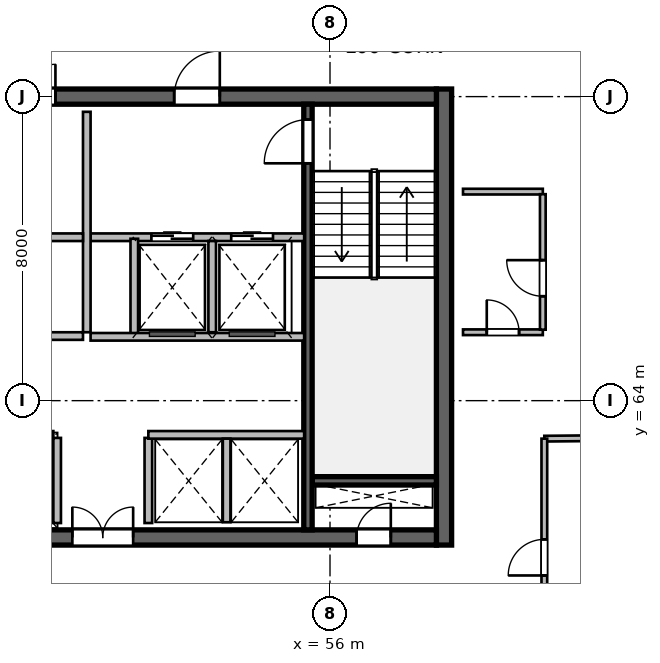
"""IFC4 building model, lengths in metres.
Left out: names, types, materials, properties, quantities, classifications, styles, units other than length and angle.
Written with IfcOpenShell. Run it as: python <this file> out.ifc"""

import sys

from ifc_helpers import new_model, si_unit, direction, frame, frame_2d, origin, place, context, subcontext, project, spatial, rectangle, extrude, source, transform, mapped, element, fill, save


model = new_model("IFC4")
c1 = context("Model", 3, precision=1e-05, world=origin(), true_north=direction((0.0, 1.0)))
c2 = subcontext(c1, "Body", "Model", "MODEL_VIEW")
j1 = project(units=[si_unit("LENGTHUNIT", "METRE"), si_unit("PLANEANGLEUNIT", "RADIAN")], contexts=[c1])
p1 = place(None, origin())
s1 = spatial("IfcSite", under=j1, at=p1, CompositionType="ELEMENT")
p2 = place(p1, origin())
s2 = spatial("IfcBuilding", under=s1, at=p2, CompositionType="ELEMENT")
p3 = place(p2, frame((0.0, 0.0, 271.8)))
s3 = spatial("IfcBuildingStorey", under=s2, at=p3, CompositionType="ELEMENT", Elevation=271.8)
m1 = source(origin(), c2, "Body", "SweptSolid", [
    extrude(rectangle(XDim=12.0, YDim=0.4, at=frame_2d((6.0, 0.0))), origin(), (0.0, 0.0, 1.0), 3.9),
])
p4 = place(p3, frame((59.0, 60.2, 0.0), z_axis=(0.0, 0.0, 1.0), x_axis=(0.0, 1.0, 0.0)))
e1 = element("IfcWall", 1, at=p4, inside=s3, PredefinedType="SHEAR", context=c2, shape_type="MappedRepresentation", body=[
    mapped(m1, transform((0.0, 0.0, 0.0), scale=1.0)),
])
m2 = source(origin(), c2, "Body", "SweptSolid", [
    extrude(rectangle(XDim=21.6, YDim=0.4, at=frame_2d((10.8, 0.0))), origin(), (0.0, 0.0, 1.0), 3.9),
])
p5 = place(p3, frame((37.2, 60.4, 0.0), z_axis=(0.0, 0.0, 1.0), x_axis=(1.0, 0.0, 0.0)))
e2 = element("IfcWall", 2, at=p5, inside=s3, PredefinedType="SHEAR", context=c2, shape_type="MappedRepresentation", body=[
    mapped(m2, transform((0.0, 0.0, 0.0), scale=1.0)),
])
p6 = place(p5, frame((1.1, 0.0, 0.0)))
e3 = element("IfcOpeningElement", 3, at=p6, cuts=e2, PredefinedType="OPENING", context=c2, shape_type="SweptSolid", body=[
    extrude(rectangle(XDim=1.15, YDim=2.15, at=frame_2d((0.575, 1.075))), frame((0.0, 0.21, 0.0), z_axis=(0.0, -1.0, 0.0), x_axis=(1.0, 0.0, 0.0)), (0.0, 0.0, 1.0), 0.42),
])
p7 = place(p5, frame((19.5, 0.0, 0.0)))
e4 = element("IfcOpeningElement", 4, at=p7, cuts=e2, PredefinedType="OPENING", context=c2, shape_type="SweptSolid", body=[
    extrude(rectangle(XDim=0.9, YDim=2.1, at=frame_2d((0.45, 1.05))), frame((0.0, 0.21, 0.0), z_axis=(0.0, -1.0, 0.0), x_axis=(1.0, 0.0, 0.0)), (0.0, 0.0, 1.0), 0.42),
])
p8 = place(p5, frame((12.02, 0.0, 0.0)))
e5 = element("IfcOpeningElement", 5, at=p8, cuts=e2, PredefinedType="OPENING", context=c2, shape_type="SweptSolid", body=[
    extrude(rectangle(XDim=1.6, YDim=2.15, at=frame_2d((0.8, 1.075))), frame((0.0, 0.21, 0.0), z_axis=(0.0, -1.0, 0.0), x_axis=(1.0, 0.0, 0.0)), (0.0, 0.0, 1.0), 0.42),
])
p9 = place(p3, frame((37.2, 72.0, 0.0), z_axis=(0.0, 0.0, 1.0), x_axis=(1.0, 0.0, 0.0)))
e6 = element("IfcWall", 6, at=p9, inside=s3, PredefinedType="SHEAR", context=c2, shape_type="MappedRepresentation", body=[
    mapped(m2, transform((0.0, 0.0, 0.0), scale=1.0)),
])
p10 = place(p9, frame((1.2, 0.0, 0.0)))
e7 = element("IfcOpeningElement", 7, at=p10, cuts=e6, PredefinedType="OPENING", context=c2, shape_type="SweptSolid", body=[
    extrude(rectangle(XDim=0.9, YDim=2.1, at=frame_2d((0.45, 1.05))), frame((0.0, 0.21, 0.0), z_axis=(0.0, -1.0, 0.0), x_axis=(1.0, 0.0, 0.0)), (0.0, 0.0, 1.0), 0.42),
])
p11 = place(p9, frame((14.7, 0.0, 0.0)))
e8 = element("IfcOpeningElement", 8, at=p11, cuts=e6, PredefinedType="OPENING", context=c2, shape_type="SweptSolid", body=[
    extrude(rectangle(XDim=1.2, YDim=2.15, at=frame_2d((0.6, 1.075))), frame((0.0, 0.21, 0.0), z_axis=(0.0, -1.0, 0.0), x_axis=(1.0, 0.0, 0.0)), (0.0, 0.0, 1.0), 0.42),
])
p12 = place(p9, frame((4.15, 0.0, 0.0)))
e9 = element("IfcOpeningElement", 9, at=p12, cuts=e6, PredefinedType="OPENING", context=c2, shape_type="SweptSolid", body=[
    extrude(rectangle(XDim=1.3, YDim=2.15, at=frame_2d((0.65, 1.075))), frame((0.0, 0.21, 0.0), z_axis=(0.0, -1.0, 0.0), x_axis=(1.0, 0.0, 0.0)), (0.0, 0.0, 1.0), 0.42),
])
p13 = place(p9, frame((6.76, 0.0, 0.0)))
e10 = element("IfcOpeningElement", 10, at=p13, cuts=e6, PredefinedType="OPENING", context=c2, shape_type="SweptSolid", body=[
    extrude(rectangle(XDim=0.85, YDim=2.1, at=frame_2d((0.425, 1.05))), frame((0.0, 0.21, 0.0), z_axis=(0.0, -1.0, 0.0), x_axis=(1.0, 0.0, 0.0)), (0.0, 0.0, 1.0), 0.42),
])
p14 = place(p9, frame((8.76, 0.0, 0.0)))
e11 = element("IfcOpeningElement", 11, at=p14, cuts=e6, PredefinedType="OPENING", context=c2, shape_type="SweptSolid", body=[
    extrude(rectangle(XDim=0.85, YDim=2.1, at=frame_2d((0.425, 1.05))), frame((0.0, 0.21, 0.0), z_axis=(0.0, -1.0, 0.0), x_axis=(1.0, 0.0, 0.0)), (0.0, 0.0, 1.0), 0.42),
])
p15 = place(p9, frame((10.725, 0.0, 0.0)))
e12 = element("IfcOpeningElement", 12, at=p15, cuts=e6, PredefinedType="OPENING", context=c2, shape_type="SweptSolid", body=[
    extrude(rectangle(XDim=0.85, YDim=2.1, at=frame_2d((0.425, 1.05))), frame((0.0, 0.21, 0.0), z_axis=(0.0, -1.0, 0.0), x_axis=(1.0, 0.0, 0.0)), (0.0, 0.0, 1.0), 0.42),
])
m3 = source(origin(), c2, "Body", "SweptSolid", [
    extrude(rectangle(XDim=3.27, YDim=0.22, at=frame_2d((1.635, 0.0))), origin(), (0.0, 0.0, 1.0), 3.9),
])
p16 = place(p3, frame((55.53, 61.89, 0.0), z_axis=(0.0, 0.0, 1.0), x_axis=(1.0, 0.0, 0.0)))
e13 = element("IfcWall", 13, at=p16, inside=s3, PredefinedType="SHEAR", context=c2, shape_type="MappedRepresentation", body=[
    mapped(m3, transform((0.0, 0.0, 0.0), scale=1.0)),
])
m4 = source(origin(), c2, "Body", "SweptSolid", [
    extrude(rectangle(XDim=11.2, YDim=0.22, at=frame_2d((5.6, 0.0))), origin(), (0.0, 0.0, 1.0), 3.9),
])
p17 = place(p3, frame((55.42, 60.6, 0.0), z_axis=(0.0, 0.0, 1.0), x_axis=(0.0, 1.0, 0.0)))
e14 = element("IfcWall", 14, at=p17, inside=s3, PredefinedType="SHEAR", context=c2, shape_type="MappedRepresentation", body=[
    mapped(m4, transform((0.0, 0.0, 0.0), scale=1.0)),
])
p18 = place(p17, frame((9.645, 0.0, 0.0)))
e15 = element("IfcOpeningElement", 15, at=p18, cuts=e14, PredefinedType="OPENING", context=c2, shape_type="SweptSolid", body=[
    extrude(rectangle(XDim=1.15, YDim=2.15, at=frame_2d((0.575, 1.075))), frame((0.0, 0.12, 0.0), z_axis=(0.0, -1.0, 0.0), x_axis=(1.0, 0.0, 0.0)), (0.0, 0.0, 1.0), 0.24),
])
m5 = source(origin(), c2, "Body", "SweptSolid", [
    extrude(rectangle(XDim=2.24, YDim=0.2, at=frame_2d((1.12, 0.0))), origin(), (0.0, 0.0, 1.0), 3.64),
])
for number, where, z_axis, x_axis in (
    (16, (48.82, 60.78, 0.0), (0.0, 0.0, 1.0), (0.0, 1.0, 0.0)),
    (17, (51.22, 60.78, 0.0), (0.0, 0.0, 1.0), (0.0, 1.0, 0.0)),
):
    element("IfcWall", number, at=place(p3, frame(where, z_axis=z_axis, x_axis=x_axis)), inside=s3, PredefinedType="SOLIDWALL", context=c2, shape_type="MappedRepresentation", body=[
        mapped(m5, transform((0.0, 0.0, 0.0), scale=1.0)),
    ])
m6 = source(origin(), c2, "Body", "SweptSolid", [
    extrude(rectangle(XDim=5.62, YDim=0.2, at=frame_2d((2.81, 0.0))), origin(), (0.0, 0.0, 1.0), 3.64),
])
p19 = place(p3, frame((49.7, 68.3, 0.0), z_axis=(0.0, 0.0, 1.0), x_axis=(1.0, 0.0, 0.0)))
e18 = element("IfcWall", 18, at=p19, inside=s3, PredefinedType="SOLIDWALL", context=c2, shape_type="MappedRepresentation", body=[
    mapped(m6, transform((0.0, 0.0, 0.0), scale=1.0)),
])
p20 = place(p19, frame((1.6, 0.0, 0.0)))
e19 = element("IfcOpeningElement", 19, at=p20, cuts=e18, PredefinedType="OPENING", context=c2, shape_type="SweptSolid", body=[
    extrude(rectangle(XDim=1.1, YDim=2.15, at=frame_2d((0.55, 1.075))), frame((0.0, 0.11, 0.0), z_axis=(0.0, -1.0, 0.0), x_axis=(1.0, 0.0, 0.0)), (0.0, 0.0, 1.0), 0.22),
])
p21 = place(p19, frame((3.7, 0.0, 0.0)))
e20 = element("IfcOpeningElement", 20, at=p21, cuts=e18, PredefinedType="OPENING", context=c2, shape_type="SweptSolid", body=[
    extrude(rectangle(XDim=1.1, YDim=2.15, at=frame_2d((0.55, 1.075))), frame((0.0, 0.11, 0.0), z_axis=(0.0, -1.0, 0.0), x_axis=(1.0, 0.0, 0.0)), (0.0, 0.0, 1.0), 0.22),
])
m7 = source(origin(), c2, "Body", "SweptSolid", [
    extrude(rectangle(XDim=5.8, YDim=0.2, at=frame_2d((2.9, 0.0))), origin(), (0.0, 0.0, 1.0), 3.64),
])
p22 = place(p3, frame((49.6, 65.8, 0.0), z_axis=(0.0, 0.0, 1.0), x_axis=(0.0, 1.0, 0.0)))
e21 = element("IfcWall", 21, at=p22, inside=s3, PredefinedType="SOLIDWALL", context=c2, shape_type="MappedRepresentation", body=[
    mapped(m7, transform((0.0, 0.0, 0.0), scale=1.0)),
])
m8 = source(origin(), c2, "Body", "SweptSolid", [
    extrude(rectangle(XDim=2.58, YDim=0.2, at=frame_2d((1.29, 0.0))), origin(), (0.0, 0.0, 1.0), 3.64),
])
p23 = place(p3, frame((50.85, 65.68, 0.0), z_axis=(0.0, 0.0, 1.0), x_axis=(0.0, 1.0, 0.0)))
e22 = element("IfcWall", 22, at=p23, inside=s3, PredefinedType="SOLIDWALL", context=c2, shape_type="MappedRepresentation", body=[
    mapped(m8, transform((0.0, 0.0, 0.0), scale=1.0)),
])
m9 = source(origin(), c2, "Body", "SweptSolid", [
    extrude(rectangle(XDim=2.4, YDim=0.2, at=frame_2d((1.2, 0.0))), origin(), (0.0, 0.0, 1.0), 3.64),
])
p24 = place(p3, frame((52.9, 65.8, 0.0), z_axis=(0.0, 0.0, 1.0), x_axis=(0.0, 1.0, 0.0)))
e23 = element("IfcWall", 23, at=p24, inside=s3, PredefinedType="SOLIDWALL", context=c2, shape_type="MappedRepresentation", body=[
    mapped(m9, transform((0.0, 0.0, 0.0), scale=1.0)),
])
p25 = place(p3, frame((49.7, 65.68, 0.0), z_axis=(0.0, 0.0, 1.0), x_axis=(1.0, 0.0, 0.0)))
e24 = element("IfcWall", 24, at=p25, inside=s3, PredefinedType="SOLIDWALL", context=c2, shape_type="MappedRepresentation", body=[
    mapped(m6, transform((0.0, 0.0, 0.0), scale=1.0)),
])
m10 = source(origin(), c2, "Body", "SweptSolid", [
    extrude(rectangle(XDim=8.8, YDim=0.2, at=frame_2d((4.4, 0.0))), origin(), (0.0, 0.0, 1.0), 3.64),
])
p26 = place(p3, frame((40.7, 68.3, 0.0), z_axis=(0.0, 0.0, 1.0), x_axis=(1.0, 0.0, 0.0)))
e25 = element("IfcWall", 25, at=p26, inside=s3, PredefinedType="SOLIDWALL", context=c2, shape_type="MappedRepresentation", body=[
    mapped(m10, transform((0.0, 0.0, 0.0), scale=1.0)),
])
m11 = source(origin(), c2, "Body", "SweptSolid", [
    extrude(rectangle(XDim=8.02, YDim=0.2, at=frame_2d((4.01, 0.0))), origin(), (0.0, 0.0, 1.0), 3.64),
])
p27 = place(p3, frame((40.7, 63.1, 0.0), z_axis=(0.0, 0.0, 1.0), x_axis=(1.0, 0.0, 0.0)))
e26 = element("IfcWall", 26, at=p27, inside=s3, PredefinedType="SOLIDWALL", context=c2, shape_type="MappedRepresentation", body=[
    mapped(m11, transform((0.0, 0.0, 0.0), scale=1.0)),
])
p28 = place(p27, frame((0.72, 0.0, 0.0)))
e27 = element("IfcOpeningElement", 27, at=p28, cuts=e26, PredefinedType="OPENING", context=c2, shape_type="SweptSolid", body=[
    extrude(rectangle(XDim=1.0, YDim=2.15, at=frame_2d((0.5, 1.075))), frame((0.0, 0.11, 0.0), z_axis=(0.0, -1.0, 0.0), x_axis=(1.0, 0.0, 0.0)), (0.0, 0.0, 1.0), 0.22),
])
p29 = place(p27, frame((2.62, 0.0, 0.0)))
e28 = element("IfcOpeningElement", 28, at=p29, cuts=e26, PredefinedType="OPENING", context=c2, shape_type="SweptSolid", body=[
    extrude(rectangle(XDim=1.0, YDim=2.15, at=frame_2d((0.5, 1.075))), frame((0.0, 0.11, 0.0), z_axis=(0.0, -1.0, 0.0), x_axis=(1.0, 0.0, 0.0)), (0.0, 0.0, 1.0), 0.22),
])
p30 = place(p27, frame((4.55, 0.0, 0.0)))
e29 = element("IfcOpeningElement", 29, at=p30, cuts=e26, PredefinedType="OPENING", context=c2, shape_type="SweptSolid", body=[
    extrude(rectangle(XDim=1.0, YDim=2.15, at=frame_2d((0.5, 1.075))), frame((0.0, 0.11, 0.0), z_axis=(0.0, -1.0, 0.0), x_axis=(1.0, 0.0, 0.0)), (0.0, 0.0, 1.0), 0.22),
])
p31 = place(p27, frame((6.55, 0.0, 0.0)))
e30 = element("IfcOpeningElement", 30, at=p31, cuts=e26, PredefinedType="OPENING", context=c2, shape_type="SweptSolid", body=[
    extrude(rectangle(XDim=1.0, YDim=2.15, at=frame_2d((0.5, 1.075))), frame((0.0, 0.11, 0.0), z_axis=(0.0, -1.0, 0.0), x_axis=(1.0, 0.0, 0.0)), (0.0, 0.0, 1.0), 0.22),
])
m12 = source(origin(), c2, "Body", "SweptSolid", [
    extrude(rectangle(XDim=4.1, YDim=0.2, at=frame_2d((2.05, 0.0))), origin(), (0.0, 0.0, 1.0), 3.64),
])
p32 = place(p3, frame((51.22, 63.1, 0.0), z_axis=(0.0, 0.0, 1.0), x_axis=(1.0, 0.0, 0.0)))
e31 = element("IfcWall", 31, at=p32, inside=s3, PredefinedType="SOLIDWALL", context=c2, shape_type="MappedRepresentation", body=[
    mapped(m12, transform((0.0, 0.0, 0.0), scale=1.0)),
])
m13 = source(origin(), c2, "Body", "SweptSolid", [
    extrude(rectangle(XDim=2.2, YDim=0.2, at=frame_2d((1.1, 0.0))), origin(), (0.0, 0.0, 1.0), 3.64),
])
p33 = place(p3, frame((53.28, 60.8, 0.0), z_axis=(0.0, 0.0, 1.0), x_axis=(0.0, 1.0, 0.0)))
e32 = element("IfcWall", 32, at=p33, inside=s3, PredefinedType="SOLIDWALL", context=c2, shape_type="MappedRepresentation", body=[
    mapped(m13, transform((0.0, 0.0, 0.0), scale=1.0)),
])
p34 = place(p3, frame((40.7, 65.7, 0.0), z_axis=(0.0, 0.0, 1.0), x_axis=(1.0, 0.0, 0.0)))
e33 = element("IfcWall", 33, at=p34, inside=s3, PredefinedType="SOLIDWALL", context=c2, shape_type="MappedRepresentation", body=[
    mapped(m10, transform((0.0, 0.0, 0.0), scale=1.0)),
])
p35 = place(p34, frame((3.8, 0.0, 0.0)))
e34 = element("IfcOpeningElement", 34, at=p35, cuts=e33, PredefinedType="OPENING", context=c2, shape_type="SweptSolid", body=[
    extrude(rectangle(XDim=0.95, YDim=2.15, at=frame_2d((0.475, 1.075))), frame((0.0, 0.11, 0.0), z_axis=(0.0, -1.0, 0.0), x_axis=(1.0, 0.0, 0.0)), (0.0, 0.0, 1.0), 0.22),
])
m14 = source(origin(), c2, "Body", "SweptSolid", [
    extrude(rectangle(XDim=2.1, YDim=0.15, at=frame_2d((1.05, 0.0))), origin(), (0.0, 0.0, 1.0), 3.64),
])
p36 = place(p3, frame((59.5, 65.8, 0.0), z_axis=(0.0, 0.0, 1.0), x_axis=(1.0, 0.0, 0.0)))
e35 = element("IfcWall", 35, at=p36, inside=s3, PredefinedType="PARTITIONING", context=c2, shape_type="MappedRepresentation", body=[
    mapped(m14, transform((0.0, 0.0, 0.0), scale=1.0)),
])
p37 = place(p36, frame((0.625, 0.0, 0.0)))
e36 = element("IfcOpeningElement", 36, at=p37, cuts=e35, PredefinedType="OPENING", context=c2, shape_type="SweptSolid", body=[
    extrude(rectangle(XDim=0.85, YDim=2.1, at=frame_2d((0.425, 1.05))), frame((0.0, 0.085, 0.0), z_axis=(0.0, -1.0, 0.0), x_axis=(1.0, 0.0, 0.0)), (0.0, 0.0, 1.0), 0.17),
])
p38 = place(p3, frame((59.5, 69.5, 0.0), z_axis=(0.0, 0.0, 1.0), x_axis=(1.0, 0.0, 0.0)))
e37 = element("IfcWall", 37, at=p38, inside=s3, PredefinedType="PARTITIONING", context=c2, shape_type="MappedRepresentation", body=[
    mapped(m14, transform((0.0, 0.0, 0.0), scale=1.0)),
])
m15 = source(origin(), c2, "Body", "SweptSolid", [
    extrude(rectangle(XDim=3.565, YDim=0.15, at=frame_2d((1.783, 0.0))), origin(), (0.0, 0.0, 1.0), 3.64),
])
p39 = place(p3, frame((61.6, 65.867, 0.0), z_axis=(0.0, 0.0, 1.0), x_axis=(0.0, 1.0, 0.0)))
e38 = element("IfcWall", 38, at=p39, inside=s3, PredefinedType="PARTITIONING", context=c2, shape_type="MappedRepresentation", body=[
    mapped(m15, transform((0.0, 0.0, 0.0), scale=1.0)),
])
p40 = place(p39, frame((0.88, 0.0, 0.0)))
e39 = element("IfcOpeningElement", 39, at=p40, cuts=e38, PredefinedType="OPENING", context=c2, shape_type="SweptSolid", body=[
    extrude(rectangle(XDim=0.95, YDim=2.1, at=frame_2d((0.475, 1.05))), frame((0.0, 0.085, 0.0), z_axis=(0.0, -1.0, 0.0), x_axis=(1.0, 0.0, 0.0)), (0.0, 0.0, 1.0), 0.17),
])
m16 = source(origin(), c2, "Body", "SweptSolid", [
    extrude(rectangle(XDim=13.147, YDim=0.15, at=frame_2d((6.574, 0.0))), origin(), (0.0, 0.0, 1.0), 3.64),
])
p41 = place(p3, frame((61.64, 63.0, 0.0), z_axis=(0.0, 0.0, 1.0), x_axis=(0.999960274322, 0.008913460448, 0.0)))
e40 = element("IfcWall", 40, at=p41, inside=s3, PredefinedType="PARTITIONING", context=c2, shape_type="MappedRepresentation", body=[
    mapped(m16, transform((0.0, 0.0, 0.0), scale=1.0)),
])
m17 = source(origin(), c2, "Body", "SweptSolid", [
    extrude(rectangle(XDim=5.04, YDim=0.15, at=frame_2d((2.52, 0.0))), origin(), (0.0, 0.0, 1.0), 3.64),
])
p42 = place(p3, frame((61.64, 57.96, 0.0), z_axis=(0.0, 0.0, 1.0), x_axis=(0.0, 1.0, 0.0)))
e41 = element("IfcWall", 41, at=p42, inside=s3, PredefinedType="PARTITIONING", context=c2, shape_type="MappedRepresentation", body=[
    mapped(m17, transform((0.0, 0.0, 0.0), scale=1.0)),
])
p43 = place(p42, frame((1.44, 0.0, 0.0)))
e42 = element("IfcOpeningElement", 42, at=p43, cuts=e41, PredefinedType="OPENING", context=c2, shape_type="SweptSolid", body=[
    extrude(rectangle(XDim=0.95, YDim=2.1, at=frame_2d((0.475, 1.05))), frame((0.0, 0.085, 0.0), z_axis=(0.0, -1.0, 0.0), x_axis=(1.0, 0.0, 0.0)), (0.0, 0.0, 1.0), 0.17),
])
m18 = source(origin(), c2, "Body", "SweptSolid", [
    extrude(rectangle(XDim=0.9, YDim=2.1, at=frame_2d((0.45, 1.05))), frame((0.0, 0.025, 0.0), z_axis=(0.0, -1.0, 0.0), x_axis=(1.0, 0.0, 0.0)), (0.0, 0.0, 1.0), 0.05),
])
p44 = place(p7, origin())
e43 = element("IfcDoor", 43, at=p44, inside=s3, OperationType="SINGLE_SWING_RIGHT", PredefinedType="DOOR", context=c2, shape_type="MappedRepresentation", body=[
    mapped(m18, transform((0.0, 0.0, 0.0), scale=1.0)),
])
fill(e4, e43)
m19 = source(origin(), c2, "Body", "SweptSolid", [
    extrude(rectangle(XDim=1.15, YDim=2.15, at=frame_2d((0.575, 1.075))), frame((0.0, 0.025, 0.0), z_axis=(0.0, -1.0, 0.0), x_axis=(1.0, 0.0, 0.0)), (0.0, 0.0, 1.0), 0.05),
])
p45 = place(p18, origin())
e44 = element("IfcDoor", 44, at=p45, inside=s3, OperationType="SINGLE_SWING_LEFT", PredefinedType="DOOR", context=c2, shape_type="MappedRepresentation", body=[
    mapped(m19, transform((0.0, 0.0, 0.0), scale=1.0)),
])
fill(e15, e44)
m20 = source(origin(), c2, "Body", "SweptSolid", [
    extrude(rectangle(XDim=1.6, YDim=2.15, at=frame_2d((0.8, 1.075))), frame((0.0, 0.025, 0.0), z_axis=(0.0, -1.0, 0.0), x_axis=(1.0, 0.0, 0.0)), (0.0, 0.0, 1.0), 0.05),
])
p46 = place(p8, origin())
e45 = element("IfcDoor", 45, at=p46, inside=s3, OperationType="DOUBLE_DOOR_SINGLE_SWING", PredefinedType="DOOR", context=c2, shape_type="MappedRepresentation", body=[
    mapped(m20, transform((0.0, 0.0, 0.0), scale=1.0)),
])
fill(e5, e45)
m21 = source(origin(), c2, "Body", "SweptSolid", [
    extrude(rectangle(XDim=1.2, YDim=2.15, at=frame_2d((0.6, 1.075))), frame((0.0, 0.025, 0.0), z_axis=(0.0, -1.0, 0.0), x_axis=(1.0, 0.0, 0.0)), (0.0, 0.0, 1.0), 0.05),
])
p47 = place(p11, origin())
e46 = element("IfcDoor", 46, at=p47, inside=s3, OperationType="SINGLE_SWING_RIGHT", PredefinedType="DOOR", context=c2, shape_type="MappedRepresentation", body=[
    mapped(m21, transform((0.0, 0.0, 0.0), scale=1.0)),
])
fill(e8, e46)
m22 = source(origin(), c2, "Body", "SweptSolid", [
    extrude(rectangle(XDim=1.1, YDim=2.15, at=frame_2d((0.55, 1.075))), frame((0.0, 0.025, 0.0), z_axis=(0.0, -1.0, 0.0), x_axis=(1.0, 0.0, 0.0)), (0.0, 0.0, 1.0), 0.05),
])
p48 = place(p20, origin())
e47 = element("IfcDoor", 47, at=p48, inside=s3, OperationType="DOUBLE_DOOR_SLIDING", PredefinedType="DOOR", context=c2, shape_type="MappedRepresentation", body=[
    mapped(m22, transform((0.0, 0.0, 0.0), scale=1.0)),
])
fill(e19, e47)
p49 = place(p21, origin())
e48 = element("IfcDoor", 48, at=p49, inside=s3, OperationType="DOUBLE_DOOR_SLIDING", PredefinedType="DOOR", context=c2, shape_type="MappedRepresentation", body=[
    mapped(m22, transform((0.0, 0.0, 0.0), scale=1.0)),
])
fill(e20, e48)
m23 = source(origin(), c2, "Body", "SweptSolid", [
    extrude(rectangle(XDim=0.85, YDim=2.1, at=frame_2d((0.425, 1.05))), frame((0.0, 0.025, 0.0), z_axis=(0.0, -1.0, 0.0), x_axis=(1.0, 0.0, 0.0)), (0.0, 0.0, 1.0), 0.05),
])
p50 = place(p15, origin())
e49 = element("IfcDoor", 49, at=p50, inside=s3, OperationType="SINGLE_SWING_RIGHT", PredefinedType="DOOR", context=c2, shape_type="MappedRepresentation", body=[
    mapped(m23, transform((0.0, 0.0, 0.0), scale=1.0)),
])
fill(e12, e49)
p51 = place(p37, origin())
e50 = element("IfcDoor", 50, at=p51, inside=s3, OperationType="SINGLE_SWING_LEFT", PredefinedType="DOOR", context=c2, shape_type="MappedRepresentation", body=[
    mapped(m23, transform((0.0, 0.0, 0.0), scale=1.0)),
])
fill(e36, e50)
m24 = source(origin(), c2, "Body", "SweptSolid", [
    extrude(rectangle(XDim=0.95, YDim=2.1, at=frame_2d((0.475, 1.05))), frame((0.0, 0.025, 0.0), z_axis=(0.0, -1.0, 0.0), x_axis=(1.0, 0.0, 0.0)), (0.0, 0.0, 1.0), 0.05),
])
p52 = place(p43, origin())
e51 = element("IfcDoor", 51, at=p52, inside=s3, OperationType="SINGLE_SWING_LEFT", PredefinedType="DOOR", context=c2, shape_type="MappedRepresentation", body=[
    mapped(m24, transform((0.0, 0.0, 0.0), scale=1.0)),
])
fill(e42, e51)
p53 = place(p40, origin())
e52 = element("IfcDoor", 52, at=p53, inside=s3, OperationType="SINGLE_SWING_RIGHT", PredefinedType="DOOR", context=c2, shape_type="MappedRepresentation", body=[
    mapped(m24, transform((0.0, 0.0, 0.0), scale=1.0)),
])
fill(e39, e52)
save(model, sys.argv[1])
